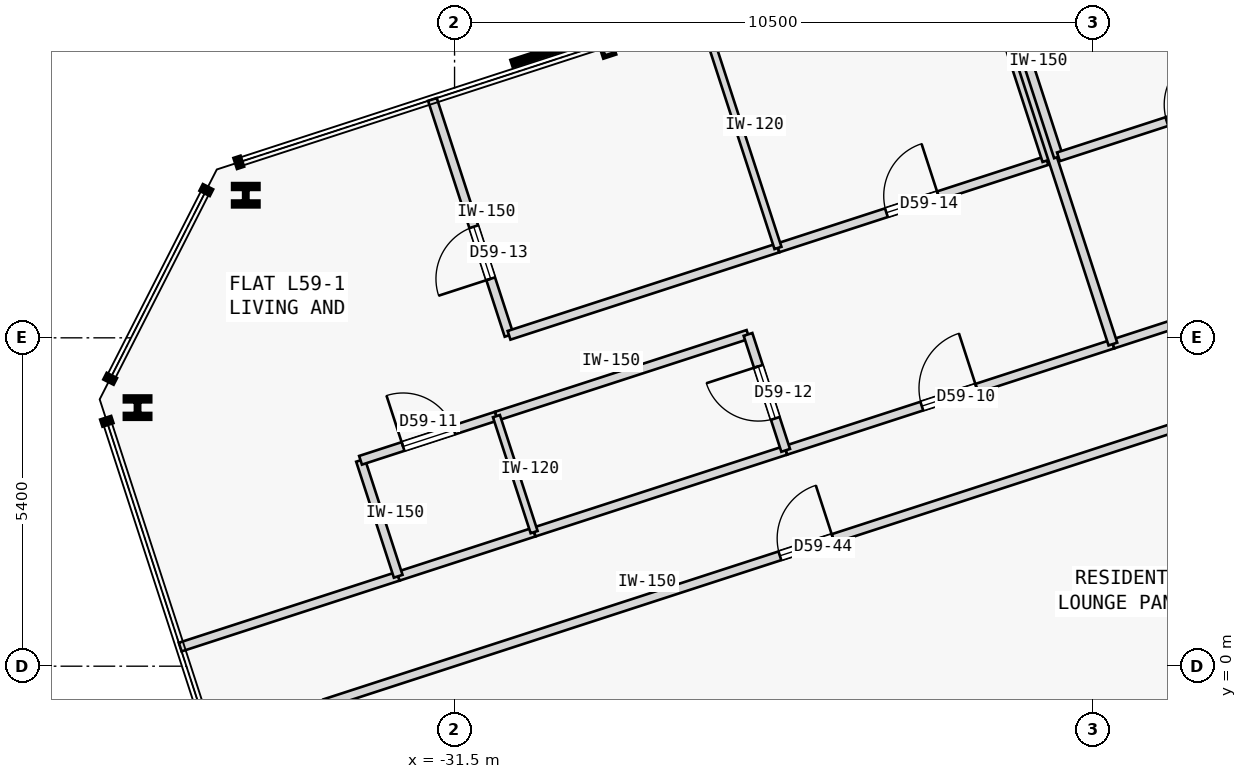
"""IFC4 building model, lengths in metres.
Left out: names, types, materials, properties, quantities, classifications, styles, units other than length and angle.
Written with IfcOpenShell. Run it as: python <this file> out.ifc"""

import sys

from ifc_helpers import new_model, si_unit, direction, frame, frame_2d, origin, origin_2d, place, context, subcontext, project, spatial, rectangle, i_section, extrude, element, fill, save


model = new_model("IFC4")
c1 = context("Model", 3, precision=1e-05, world=origin(), true_north=direction((0.0, 1.0)))
c2 = subcontext(c1, "Body", "Model", "MODEL_VIEW")
j1 = project(units=[si_unit("LENGTHUNIT", "METRE"), si_unit("PLANEANGLEUNIT", "RADIAN")], contexts=[c1])
p1 = place(None, origin())
s1 = spatial("IfcSite", under=j1, at=p1, CompositionType="ELEMENT")
p2 = place(p1, origin())
s2 = spatial("IfcBuilding", under=s1, at=p2, CompositionType="ELEMENT")
p3 = place(p2, frame((0.0, 0.0, 224.3)))
s3 = spatial("IfcBuildingStorey", under=s2, at=p3, CompositionType="ELEMENT", Elevation=224.3)
for number, where, z_axis, x_axis in (
    (1, (-34.934, 7.745, 0.0), (0.0, 0.0, 1.0), (1.0, 0.0, 0.0)),
    (2, (-36.713, 4.252, 0.0), (0.0, 0.0, 1.0), (1.0, 0.0, 0.0)),
):
    element("IfcColumn", number, at=place(p3, frame(where, z_axis=z_axis, x_axis=x_axis)), inside=s3, PredefinedType="COLUMN", context=c2, shape_type="SweptSolid", body=[
        extrude(i_section(OverallWidth=0.405, OverallDepth=0.355, WebThickness=0.042, FlangeThickness=0.068, FilletRadius=0.015, at=origin_2d()), origin(), (0.0, 0.0, 1.0), 3.35),
    ])
p4 = place(p3, frame((-36.012, 0.314, 0.0), z_axis=(0.0, 0.0, 1.0), x_axis=(0.951071182868, 0.308971851659, 0.0)))
e3 = element("IfcWall", 3, at=p4, inside=s3, PredefinedType="PARTITIONING", context=c2, shape_type="SweptSolid", body=[
    extrude(rectangle(XDim=3.77, YDim=0.15, at=frame_2d((1.885, 0.0))), origin(), (0.0, 0.0, 1.0), 3.125),
])
p5 = place(p3, frame((-26.055, 3.55, 0.0), z_axis=(0.0, 0.0, 1.0), x_axis=(0.951063554534, 0.308995332064, 0.0)))
e4 = element("IfcWall", 4, at=p5, inside=s3, PredefinedType="PARTITIONING", context=c2, shape_type="SweptSolid", body=[
    extrude(rectangle(XDim=5.658, YDim=0.15, at=frame_2d((2.829, 0.0))), origin(), (0.0, 0.0, 1.0), 3.125),
])
p6 = place(p5, frame((2.354, 0.0, 0.0)))
e5 = element("IfcOpeningElement", 5, at=p6, cuts=e4, PredefinedType="OPENING", context=c2, shape_type="SweptSolid", body=[
    extrude(rectangle(XDim=0.95, YDim=2.15, at=frame_2d((0.475, 1.075))), frame((0.0, 0.085, 0.0), z_axis=(0.0, -1.0, 0.0), x_axis=(1.0, 0.0, 0.0)), (0.0, 0.0, 1.0), 0.17),
])
p7 = place(p3, frame((-32.427, 1.479, 0.0), z_axis=(0.0, 0.0, 1.0), x_axis=(0.951045519245, 0.309050837767, 0.0)))
e6 = element("IfcWall", 6, at=p7, inside=s3, PredefinedType="PARTITIONING", context=c2, shape_type="SweptSolid", body=[
    extrude(rectangle(XDim=2.35, YDim=0.15, at=frame_2d((1.175, 0.0))), origin(), (0.0, 0.0, 1.0), 3.125),
])
p8 = place(p3, frame((-30.192, 2.205, 0.0), z_axis=(0.0, 0.0, 1.0), x_axis=(0.951052627573, 0.309028962374, 0.0)))
e7 = element("IfcWall", 7, at=p8, inside=s3, PredefinedType="PARTITIONING", context=c2, shape_type="SweptSolid", body=[
    extrude(rectangle(XDim=4.35, YDim=0.15, at=frame_2d((2.175, 0.0))), origin(), (0.0, 0.0, 1.0), 3.125),
])
p9 = place(p3, frame((-20.674, 5.298, 0.0), z_axis=(0.0, 0.0, 1.0), x_axis=(0.951057168147, 0.309014988174, 0.0)))
e8 = element("IfcWall", 8, at=p9, inside=s3, PredefinedType="PARTITIONING", context=c2, shape_type="SweptSolid", body=[
    extrude(rectangle(XDim=3.65, YDim=0.15, at=frame_2d((1.825, 0.0))), origin(), (0.0, 0.0, 1.0), 3.125),
])
p10 = place(p3, frame((-33.633, -0.616, 0.0), z_axis=(0.0, 0.0, 1.0), x_axis=(0.951058192995, 0.309011833974, 0.0)))
e9 = element("IfcWall", 9, at=p10, inside=s3, PredefinedType="PARTITIONING", context=c2, shape_type="SweptSolid", body=[
    extrude(rectangle(XDim=16.657, YDim=0.15, at=frame_2d((8.329, 0.0))), origin(), (0.0, 0.0, 1.0), 3.125),
])
p11 = place(p10, frame((7.868, 0.0, 0.0)))
e10 = element("IfcOpeningElement", 10, at=p11, cuts=e9, PredefinedType="OPENING", context=c2, shape_type="SweptSolid", body=[
    extrude(rectangle(XDim=0.92, YDim=2.15, at=frame_2d((0.46, 1.075))), frame((0.0, 0.085, 0.0), z_axis=(0.0, -1.0, 0.0), x_axis=(1.0, 0.0, 0.0)), (0.0, 0.0, 1.0), 0.17),
])
p12 = place(p3, frame((-32.427, 1.479, 0.0), z_axis=(0.0, 0.0, 1.0), x_axis=(-0.309022749039, 0.951054646472, 0.0)))
e11 = element("IfcWall", 11, at=p12, inside=s3, PredefinedType="PARTITIONING", context=c2, shape_type="SweptSolid", body=[
    extrude(rectangle(XDim=2.005, YDim=0.15, at=frame_2d((1.002, 0.0))), origin(), (0.0, 0.0, 1.0), 3.125),
])
p13 = place(p3, frame((-33.046, 3.386, 0.0), z_axis=(0.0, 0.0, 1.0), x_axis=(0.951045519245, 0.309050837767, 0.0)))
e12 = element("IfcWall", 12, at=p13, inside=s3, PredefinedType="PARTITIONING", context=c2, shape_type="SweptSolid", body=[
    extrude(rectangle(XDim=2.35, YDim=0.15, at=frame_2d((1.175, 0.0))), origin(), (0.0, 0.0, 1.0), 3.125),
])
p14 = place(p13, frame((0.735, 0.0, 0.0)))
e13 = element("IfcOpeningElement", 13, at=p14, cuts=e12, PredefinedType="OPENING", context=c2, shape_type="SweptSolid", body=[
    extrude(rectangle(XDim=0.88, YDim=2.15, at=frame_2d((0.44, 1.075))), frame((0.0, 0.085, 0.0), z_axis=(0.0, -1.0, 0.0), x_axis=(1.0, 0.0, 0.0)), (0.0, 0.0, 1.0), 0.17),
])
p15 = place(p3, frame((-30.811, 4.112, 0.0), z_axis=(0.0, 0.0, 1.0), x_axis=(0.951069122051, 0.308978195154, 0.0)))
e14 = element("IfcWall", 14, at=p15, inside=s3, PredefinedType="PARTITIONING", context=c2, shape_type="SweptSolid", body=[
    extrude(rectangle(XDim=4.35, YDim=0.15, at=frame_2d((2.175, 0.0))), origin(), (0.0, 0.0, 1.0), 3.125),
])
p16 = place(p3, frame((-26.055, 3.55, 0.0), z_axis=(0.0, 0.0, 1.0), x_axis=(-0.309058537449, 0.951043017129, 0.0)))
e15 = element("IfcWall", 15, at=p16, inside=s3, PredefinedType="PARTITIONING", context=c2, shape_type="SweptSolid", body=[
    extrude(rectangle(XDim=2.005, YDim=0.15, at=frame_2d((1.002, 0.0))), origin(), (0.0, 0.0, 1.0), 3.125),
])
p17 = place(p16, frame((0.552, 0.0, 0.0)))
e16 = element("IfcOpeningElement", 16, at=p17, cuts=e15, PredefinedType="OPENING", context=c2, shape_type="SweptSolid", body=[
    extrude(rectangle(XDim=0.9, YDim=2.15, at=frame_2d((0.45, 1.075))), frame((0.0, 0.085, 0.0), z_axis=(0.0, -1.0, 0.0), x_axis=(1.0, 0.0, 0.0)), (0.0, 0.0, 1.0), 0.17),
])
p18 = place(p3, frame((-30.604, 5.441, 0.0), z_axis=(0.0, 0.0, 1.0), x_axis=(-0.309018403393, 0.951056058476, 0.0)))
e17 = element("IfcWall", 17, at=p18, inside=s3, PredefinedType="PARTITIONING", context=c2, shape_type="SweptSolid", body=[
    extrude(rectangle(XDim=4.079, YDim=0.15, at=frame_2d((2.04, 0.0))), origin(), (0.0, 0.0, 1.0), 3.125),
])
p19 = place(p18, frame((0.978, 0.0, 0.0)))
e18 = element("IfcOpeningElement", 18, at=p19, cuts=e17, PredefinedType="OPENING", context=c2, shape_type="SweptSolid", body=[
    extrude(rectangle(XDim=0.9, YDim=2.15, at=frame_2d((0.45, 1.075))), frame((0.0, 0.085, 0.0), z_axis=(0.0, -1.0, 0.0), x_axis=(1.0, 0.0, 0.0)), (0.0, 0.0, 1.0), 0.17),
])
p20 = place(p3, frame((-30.604, 5.441, 0.0), z_axis=(0.0, 0.0, 1.0), x_axis=(0.951070715387, 0.308973290646, 0.0)))
e19 = element("IfcWall", 19, at=p20, inside=s3, PredefinedType="PARTITIONING", context=c2, shape_type="SweptSolid", body=[
    extrude(rectangle(XDim=4.65, YDim=0.15, at=frame_2d((2.325, 0.0))), origin(), (0.0, 0.0, 1.0), 3.125),
])
p21 = place(p3, frame((-26.181, 6.878, 0.0), z_axis=(0.0, 0.0, 1.0), x_axis=(0.951050272606, 0.309036209813, 0.0)))
e20 = element("IfcWall", 20, at=p21, inside=s3, PredefinedType="PARTITIONING", context=c2, shape_type="SweptSolid", body=[
    extrude(rectangle(XDim=4.65, YDim=0.15, at=frame_2d((2.325, 0.0))), origin(), (0.0, 0.0, 1.0), 3.125),
])
p22 = place(p21, frame((1.875, 0.0, 0.0)))
e21 = element("IfcOpeningElement", 21, at=p22, cuts=e20, PredefinedType="OPENING", context=c2, shape_type="SweptSolid", body=[
    extrude(rectangle(XDim=0.9, YDim=2.15, at=frame_2d((0.45, 1.075))), frame((0.0, 0.085, 0.0), z_axis=(0.0, -1.0, 0.0), x_axis=(1.0, 0.0, 0.0)), (0.0, 0.0, 1.0), 0.17),
])
p23 = place(p3, frame((-21.759, 8.315, 0.0), z_axis=(0.0, 0.0, 1.0), x_axis=(-0.309018403393, 0.951056058476, 0.0)))
e22 = element("IfcWall", 22, at=p23, inside=s3, PredefinedType="PARTITIONING", context=c2, shape_type="SweptSolid", body=[
    extrude(rectangle(XDim=4.079, YDim=0.15, at=frame_2d((2.04, 0.0))), origin(), (0.0, 0.0, 1.0), 3.125),
])
p24 = place(p3, frame((-20.674, 5.298, 0.0), z_axis=(0.0, 0.0, 1.0), x_axis=(-0.309029230739, 0.951052540372, 0.0)))
e23 = element("IfcWall", 23, at=p24, inside=s3, PredefinedType="PARTITIONING", context=c2, shape_type="SweptSolid", body=[
    extrude(rectangle(XDim=7.284, YDim=0.15, at=frame_2d((3.642, 0.0))), origin(), (0.0, 0.0, 1.0), 3.125),
])
p25 = place(p3, frame((-30.192, 2.205, 0.0), z_axis=(0.0, 0.0, 1.0), x_axis=(-0.309022749039, 0.951054646472, 0.0)))
e24 = element("IfcWall", 24, at=p25, inside=s3, PredefinedType="PARTITIONING", context=c2, shape_type="SweptSolid", body=[
    extrude(rectangle(XDim=2.005, YDim=0.12, at=frame_2d((1.002, 0.0))), origin(), (0.0, 0.0, 1.0), 3.125),
])
p26 = place(p3, frame((-26.181, 6.878, 0.0), z_axis=(0.0, 0.0, 1.0), x_axis=(-0.309018403393, 0.951056058476, 0.0)))
e25 = element("IfcWall", 25, at=p26, inside=s3, PredefinedType="PARTITIONING", context=c2, shape_type="SweptSolid", body=[
    extrude(rectangle(XDim=4.079, YDim=0.12, at=frame_2d((2.04, 0.0))), origin(), (0.0, 0.0, 1.0), 3.125),
])
p27 = place(p3, frame((-21.569, 8.377, 0.0), z_axis=(0.0, 0.0, 1.0), x_axis=(-0.309018403393, 0.951056058476, 0.0)))
e26 = element("IfcWall", 26, at=p27, inside=s3, PredefinedType="PARTITIONING", context=c2, shape_type="SweptSolid", body=[
    extrude(rectangle(XDim=4.079, YDim=0.15, at=frame_2d((2.04, 0.0))), origin(), (0.0, 0.0, 1.0), 3.125),
])
p28 = place(p3, frame((-21.569, 8.377, 0.0), z_axis=(0.0, 0.0, 1.0), x_axis=(0.951050272606, 0.309036209813, 0.0)))
e27 = element("IfcWall", 27, at=p28, inside=s3, PredefinedType="PARTITIONING", context=c2, shape_type="SweptSolid", body=[
    extrude(rectangle(XDim=4.65, YDim=0.15, at=frame_2d((2.325, 0.0))), origin(), (0.0, 0.0, 1.0), 3.125),
])
p29 = place(p28, frame((1.875, 0.0, 0.0)))
e28 = element("IfcOpeningElement", 28, at=p29, cuts=e27, PredefinedType="OPENING", context=c2, shape_type="SweptSolid", body=[
    extrude(rectangle(XDim=0.9, YDim=2.15, at=frame_2d((0.45, 1.075))), frame((0.0, 0.085, 0.0), z_axis=(0.0, -1.0, 0.0), x_axis=(1.0, 0.0, 0.0)), (0.0, 0.0, 1.0), 0.17),
])
p30 = place(p3, frame((-32.179, -5.093, 0.0), z_axis=(0.0, 0.0, 1.0), x_axis=(0.951053885426, 0.309025091239, 0.0)))
e29 = element("IfcWall", 29, at=p30, inside=s3, PredefinedType="PARTITIONING", context=c2, shape_type="SweptSolid", body=[
    extrude(rectangle(XDim=16.657, YDim=0.15, at=frame_2d((8.329, 0.0))), origin(), (0.0, 0.0, 1.0), 3.125),
])
p31 = place(p6, origin())
e30 = element("IfcDoor", 30, at=p31, inside=s3, OperationType="SINGLE_SWING_RIGHT", PredefinedType="DOOR", context=c2, shape_type="SweptSolid", body=[
    extrude(rectangle(XDim=0.95, YDim=2.15, at=frame_2d((0.475, 1.075))), frame((0.0, 0.025, 0.0), z_axis=(0.0, -1.0, 0.0), x_axis=(1.0, 0.0, 0.0)), (0.0, 0.0, 1.0), 0.05),
])
fill(e5, e30)
p32 = place(p14, origin())
e31 = element("IfcDoor", 31, at=p32, inside=s3, OperationType="SINGLE_SWING_LEFT", PredefinedType="DOOR", context=c2, shape_type="SweptSolid", body=[
    extrude(rectangle(XDim=0.88, YDim=2.15, at=frame_2d((0.44, 1.075))), frame((0.0, 0.025, 0.0), z_axis=(0.0, -1.0, 0.0), x_axis=(1.0, 0.0, 0.0)), (0.0, 0.0, 1.0), 0.05),
])
fill(e13, e31)
p33 = place(p17, origin())
e32 = element("IfcDoor", 32, at=p33, inside=s3, OperationType="SINGLE_SWING_RIGHT", PredefinedType="DOOR", context=c2, shape_type="SweptSolid", body=[
    extrude(rectangle(XDim=0.9, YDim=2.15, at=frame_2d((0.45, 1.075))), frame((0.0, 0.025, 0.0), z_axis=(0.0, -1.0, 0.0), x_axis=(1.0, 0.0, 0.0)), (0.0, 0.0, 1.0), 0.05),
])
fill(e16, e32)
p34 = place(p19, origin())
e33 = element("IfcDoor", 33, at=p34, inside=s3, OperationType="SINGLE_SWING_LEFT", PredefinedType="DOOR", context=c2, shape_type="SweptSolid", body=[
    extrude(rectangle(XDim=0.9, YDim=2.15, at=frame_2d((0.45, 1.075))), frame((0.0, 0.025, 0.0), z_axis=(0.0, -1.0, 0.0), x_axis=(1.0, 0.0, 0.0)), (0.0, 0.0, 1.0), 0.05),
])
fill(e18, e33)
p35 = place(p22, origin())
e34 = element("IfcDoor", 34, at=p35, inside=s3, OperationType="SINGLE_SWING_RIGHT", PredefinedType="DOOR", context=c2, shape_type="SweptSolid", body=[
    extrude(rectangle(XDim=0.9, YDim=2.15, at=frame_2d((0.45, 1.075))), frame((0.0, 0.025, 0.0), z_axis=(0.0, -1.0, 0.0), x_axis=(1.0, 0.0, 0.0)), (0.0, 0.0, 1.0), 0.05),
])
fill(e21, e34)
p36 = place(p29, origin())
e35 = element("IfcDoor", 35, at=p36, inside=s3, OperationType="SINGLE_SWING_RIGHT", PredefinedType="DOOR", context=c2, shape_type="SweptSolid", body=[
    extrude(rectangle(XDim=0.9, YDim=2.15, at=frame_2d((0.45, 1.075))), frame((0.0, 0.025, 0.0), z_axis=(0.0, -1.0, 0.0), x_axis=(1.0, 0.0, 0.0)), (0.0, 0.0, 1.0), 0.05),
])
fill(e28, e35)
p37 = place(p11, origin())
e36 = element("IfcDoor", 36, at=p37, inside=s3, OperationType="SINGLE_SWING_RIGHT", PredefinedType="DOOR", context=c2, shape_type="SweptSolid", body=[
    extrude(rectangle(XDim=0.92, YDim=2.15, at=frame_2d((0.46, 1.075))), frame((0.0, 0.025, 0.0), z_axis=(0.0, -1.0, 0.0), x_axis=(1.0, 0.0, 0.0)), (0.0, 0.0, 1.0), 0.05),
])
fill(e10, e36)
save(model, sys.argv[1])
